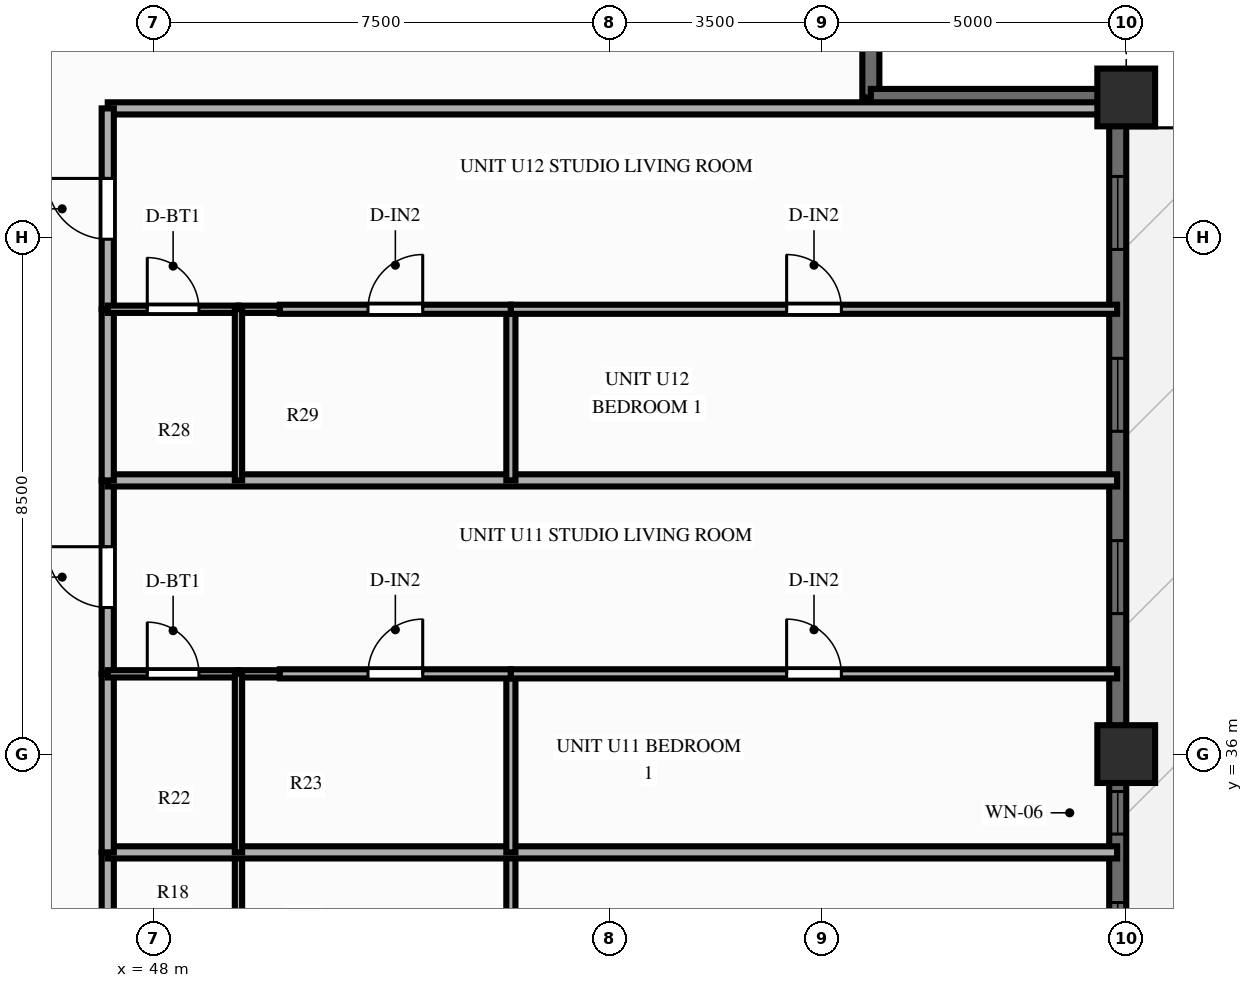
"""IFC4 building model, lengths in metres.
Left out: names, types, materials, properties, quantities, classifications, styles, units other than length and angle.
Written with IfcOpenShell. Run it as: python <this file> out.ifc"""

import sys

from ifc_helpers import new_model, si_unit, direction, frame, frame_2d, origin, origin_2d, place, context, subcontext, project, spatial, rectangle, extrude, source, transform, mapped, element, fill, save


model = new_model("IFC4")
c1 = context("Model", 3, precision=1e-05, world=origin(), true_north=direction((0.0, 1.0)))
c2 = subcontext(c1, "Body", "Model", "MODEL_VIEW")
j1 = project(units=[si_unit("LENGTHUNIT", "METRE"), si_unit("PLANEANGLEUNIT", "RADIAN")], contexts=[c1])
p1 = place(None, origin())
s1 = spatial("IfcSite", under=j1, at=p1, CompositionType="ELEMENT")
p2 = place(p1, origin())
s2 = spatial("IfcBuilding", under=s1, at=p2, CompositionType="ELEMENT")
p3 = place(p2, frame((0.0, 0.0, 92.85)))
s3 = spatial("IfcBuildingStorey", under=s2, at=p3, CompositionType="ELEMENT", Elevation=92.85)
m1 = source(origin(), c2, "Body", "SweptSolid", [
    extrude(rectangle(XDim=0.95, YDim=0.95, at=origin_2d()), origin(), (0.0, 0.0, 1.0), 3.0),
])
for number, where, z_axis, x_axis in (
    (1, (64.0, 36.0, 0.0), (0.0, 0.0, 1.0), (1.0, 0.0, 0.0)),
    (2, (64.0, 46.8, 0.0), (0.0, 0.0, 1.0), (1.0, 0.0, 0.0)),
):
    element("IfcColumn", number, at=place(p3, frame(where, z_axis=z_axis, x_axis=x_axis)), inside=s3, PredefinedType="COLUMN", context=c2, shape_type="MappedRepresentation", body=[
        mapped(m1, transform((0.0, 0.0, 0.0), scale=1.0)),
    ])
p4 = place(p3, frame((63.86, 7.2, 0.0), z_axis=(0.0, 0.0, 1.0), x_axis=(0.0, 1.0, 0.0)))
e3 = element("IfcWall", 3, at=p4, inside=s3, PredefinedType="SOLIDWALL", context=c2, shape_type="SweptSolid", body=[
    extrude(rectangle(XDim=39.6, YDim=0.28, at=frame_2d((19.8, 0.0))), origin(), (0.0, 0.0, 1.0), 2.28),
])
p5 = place(p4, frame((1.374, 0.0, 0.25)))
e4 = element("IfcOpeningElement", 4, at=p5, cuts=e3, PredefinedType="OPENING", context=c2, shape_type="SweptSolid", body=[
    extrude(rectangle(XDim=1.2, YDim=1.5, at=frame_2d((0.6, 0.75))), frame((0.0, 0.152, 0.0), z_axis=(0.0, -1.0, 0.0), x_axis=(1.0, 0.0, 0.0)), (0.0, 0.0, 1.0), 0.304),
])
p6 = place(p4, frame((4.458, 0.0, 0.25)))
e5 = element("IfcOpeningElement", 5, at=p6, cuts=e3, PredefinedType="OPENING", context=c2, shape_type="SweptSolid", body=[
    extrude(rectangle(XDim=1.2, YDim=1.5, at=frame_2d((0.6, 0.75))), frame((0.0, 0.152, 0.0), z_axis=(0.0, -1.0, 0.0), x_axis=(1.0, 0.0, 0.0)), (0.0, 0.0, 1.0), 0.304),
])
p7 = place(p4, frame((7.382, 0.0, 0.25)))
e6 = element("IfcOpeningElement", 6, at=p7, cuts=e3, PredefinedType="OPENING", context=c2, shape_type="SweptSolid", body=[
    extrude(rectangle(XDim=1.2, YDim=1.5, at=frame_2d((0.6, 0.75))), frame((0.0, 0.152, 0.0), z_axis=(0.0, -1.0, 0.0), x_axis=(1.0, 0.0, 0.0)), (0.0, 0.0, 1.0), 0.304),
])
p8 = place(p4, frame((11.508, 0.0, 0.25)))
e7 = element("IfcOpeningElement", 7, at=p8, cuts=e3, PredefinedType="OPENING", context=c2, shape_type="SweptSolid", body=[
    extrude(rectangle(XDim=0.7, YDim=1.5, at=frame_2d((0.35, 0.75))), frame((0.0, 0.152, 0.0), z_axis=(0.0, -1.0, 0.0), x_axis=(1.0, 0.0, 0.0)), (0.0, 0.0, 1.0), 0.304),
])
p9 = place(p4, frame((13.409, 0.0, 0.25)))
e8 = element("IfcOpeningElement", 8, at=p9, cuts=e3, PredefinedType="OPENING", context=c2, shape_type="SweptSolid", body=[
    extrude(rectangle(XDim=1.2, YDim=1.5, at=frame_2d((0.6, 0.75))), frame((0.0, 0.152, 0.0), z_axis=(0.0, -1.0, 0.0), x_axis=(1.0, 0.0, 0.0)), (0.0, 0.0, 1.0), 0.304),
])
p10 = place(p4, frame((16.468, 0.0, 0.25)))
e9 = element("IfcOpeningElement", 9, at=p10, cuts=e3, PredefinedType="OPENING", context=c2, shape_type="SweptSolid", body=[
    extrude(rectangle(XDim=1.2, YDim=1.5, at=frame_2d((0.6, 0.75))), frame((0.0, 0.152, 0.0), z_axis=(0.0, -1.0, 0.0), x_axis=(1.0, 0.0, 0.0)), (0.0, 0.0, 1.0), 0.304),
])
p11 = place(p4, frame((19.2, 0.0, 0.25)))
e10 = element("IfcOpeningElement", 10, at=p11, cuts=e3, PredefinedType="OPENING", context=c2, shape_type="SweptSolid", body=[
    extrude(rectangle(XDim=1.2, YDim=1.5, at=frame_2d((0.6, 0.75))), frame((0.0, 0.152, 0.0), z_axis=(0.0, -1.0, 0.0), x_axis=(1.0, 0.0, 0.0)), (0.0, 0.0, 1.0), 0.304),
])
p12 = place(p4, frame((23.407, 0.0, 0.0), z_axis=(0.0, 0.0, 1.0), x_axis=(-1.0, 0.0, 0.0)))
e11 = element("IfcOpeningElement", 11, at=p12, cuts=e3, PredefinedType="OPENING", context=c2, shape_type="SweptSolid", body=[
    extrude(rectangle(XDim=1.6, YDim=2.15, at=frame_2d((0.8, 1.075))), frame((0.0, 0.152, 0.0), z_axis=(0.0, -1.0, 0.0), x_axis=(1.0, 0.0, 0.0)), (0.0, 0.0, 1.0), 0.304),
])
p13 = place(p4, frame((25.159, 0.0, 0.25)))
e12 = element("IfcOpeningElement", 12, at=p13, cuts=e3, PredefinedType="OPENING", context=c2, shape_type="SweptSolid", body=[
    extrude(rectangle(XDim=1.2, YDim=1.5, at=frame_2d((0.6, 0.75))), frame((0.0, 0.152, 0.0), z_axis=(0.0, -1.0, 0.0), x_axis=(1.0, 0.0, 0.0)), (0.0, 0.0, 1.0), 0.304),
])
p14 = place(p4, frame((27.484, 0.0, 0.25)))
e13 = element("IfcOpeningElement", 13, at=p14, cuts=e3, PredefinedType="OPENING", context=c2, shape_type="SweptSolid", body=[
    extrude(rectangle(XDim=0.7, YDim=1.5, at=frame_2d((0.35, 0.75))), frame((0.0, 0.152, 0.0), z_axis=(0.0, -1.0, 0.0), x_axis=(1.0, 0.0, 0.0)), (0.0, 0.0, 1.0), 0.304),
])
p15 = place(p4, frame((31.111, 0.0, 0.25)))
e14 = element("IfcOpeningElement", 14, at=p15, cuts=e3, PredefinedType="OPENING", context=c2, shape_type="SweptSolid", body=[
    extrude(rectangle(XDim=1.2, YDim=1.5, at=frame_2d((0.6, 0.75))), frame((0.0, 0.152, 0.0), z_axis=(0.0, -1.0, 0.0), x_axis=(1.0, 0.0, 0.0)), (0.0, 0.0, 1.0), 0.304),
])
p16 = place(p4, frame((34.109, 0.0, 0.25)))
e15 = element("IfcOpeningElement", 15, at=p16, cuts=e3, PredefinedType="OPENING", context=c2, shape_type="SweptSolid", body=[
    extrude(rectangle(XDim=1.2, YDim=1.5, at=frame_2d((0.6, 0.75))), frame((0.0, 0.152, 0.0), z_axis=(0.0, -1.0, 0.0), x_axis=(1.0, 0.0, 0.0)), (0.0, 0.0, 1.0), 0.304),
])
p17 = place(p4, frame((37.101, 0.0, 0.25)))
e16 = element("IfcOpeningElement", 16, at=p17, cuts=e3, PredefinedType="OPENING", context=c2, shape_type="SweptSolid", body=[
    extrude(rectangle(XDim=1.2, YDim=1.5, at=frame_2d((0.6, 0.75))), frame((0.0, 0.152, 0.0), z_axis=(0.0, -1.0, 0.0), x_axis=(1.0, 0.0, 0.0)), (0.0, 0.0, 1.0), 0.304),
])
for number, where, z_axis, x_axis in (
    (17, (59.8, 46.8, 0.0), (0.0, 0.0, 1.0), (0.0, 1.0, 0.0)),
    (18, (59.8, 46.8, 0.0), (0.0, 0.0, 1.0), (1.0, 0.0, 0.0)),
):
    element("IfcWall", number, at=place(p3, frame(where, z_axis=z_axis, x_axis=x_axis)), inside=s3, PredefinedType="SOLIDWALL", context=c2, shape_type="SweptSolid", body=[
        extrude(rectangle(XDim=4.12, YDim=0.28, at=frame_2d((2.06, 0.0))), origin(), (0.0, 0.0, 1.0), 2.28),
    ])
p18 = place(p3, frame((47.25, 46.62, 0.0), z_axis=(0.0, 0.0, 1.0), x_axis=(1.0, 0.0, 0.0)))
e19 = element("IfcWall", 19, at=p18, inside=s3, PredefinedType="PARTITIONING", context=c2, shape_type="SweptSolid", body=[
    extrude(rectangle(XDim=16.6, YDim=0.2, at=frame_2d((8.3, 0.0))), origin(), (0.0, 0.0, 1.0), 2.79),
])
p19 = place(p3, frame((47.25, 31.534, 0.0), z_axis=(0.0, 0.0, 1.0), x_axis=(0.0, 1.0, 0.0)))
e20 = element("IfcWall", 20, at=p19, inside=s3, PredefinedType="PARTITIONING", context=c2, shape_type="SweptSolid", body=[
    extrude(rectangle(XDim=2.85, YDim=0.2, at=frame_2d((1.425, 0.0))), origin(), (0.0, 0.0, 1.0), 2.79),
])
p20 = place(p3, frame((49.4, 31.534, 0.0), z_axis=(0.0, 0.0, 1.0), x_axis=(0.0, 1.0, 0.0)))
e21 = element("IfcWall", 21, at=p20, inside=s3, PredefinedType="PARTITIONING", context=c2, shape_type="SweptSolid", body=[
    extrude(rectangle(XDim=2.85, YDim=0.12, at=frame_2d((1.425, 0.0))), origin(), (0.0, 0.0, 1.0), 2.79),
])
p21 = place(p3, frame((53.88, 31.534, 0.0), z_axis=(0.0, 0.0, 1.0), x_axis=(0.0, 1.0, 0.0)))
e22 = element("IfcWall", 22, at=p21, inside=s3, PredefinedType="PARTITIONING", context=c2, shape_type="SweptSolid", body=[
    extrude(rectangle(XDim=2.85, YDim=0.15, at=frame_2d((1.425, 0.0))), origin(), (0.0, 0.0, 1.0), 2.79),
])
p22 = place(p3, frame((47.25, 34.384, 0.0), z_axis=(0.0, 0.0, 1.0), x_axis=(1.0, 0.0, 0.0)))
e23 = element("IfcWall", 23, at=p22, inside=s3, PredefinedType="PARTITIONING", context=c2, shape_type="SweptSolid", body=[
    extrude(rectangle(XDim=16.6, YDim=0.2, at=frame_2d((8.3, 0.0))), origin(), (0.0, 0.0, 1.0), 2.79),
])
p23 = place(p3, frame((47.25, 34.384, 0.0), z_axis=(0.0, 0.0, 1.0), x_axis=(0.0, 1.0, 0.0)))
e24 = element("IfcWall", 24, at=p23, inside=s3, PredefinedType="PARTITIONING", context=c2, shape_type="SweptSolid", body=[
    extrude(rectangle(XDim=2.937, YDim=0.2, at=frame_2d((1.468, 0.0))), origin(), (0.0, 0.0, 1.0), 2.79),
])
p24 = place(p3, frame((47.25, 37.32, 0.0), z_axis=(0.0, 0.0, 1.0), x_axis=(0.0, 1.0, 0.0)))
e25 = element("IfcWall", 25, at=p24, inside=s3, PredefinedType="PARTITIONING", context=c2, shape_type="SweptSolid", body=[
    extrude(rectangle(XDim=3.182, YDim=0.2, at=frame_2d((1.591, 0.0))), origin(), (0.0, 0.0, 1.0), 2.79),
])
p25 = place(p24, frame((1.091, 0.0, 0.0)))
e26 = element("IfcOpeningElement", 26, at=p25, cuts=e25, PredefinedType="OPENING", context=c2, shape_type="SweptSolid", body=[
    extrude(rectangle(XDim=1.0, YDim=2.15, at=frame_2d((0.5, 1.075))), frame((0.0, 0.112, 0.0), z_axis=(0.0, -1.0, 0.0), x_axis=(1.0, 0.0, 0.0)), (0.0, 0.0, 1.0), 0.224),
])
p26 = place(p3, frame((47.25, 37.32, 0.0), z_axis=(0.0, 0.0, 1.0), x_axis=(1.0, 0.0, 0.0)))
e27 = element("IfcWall", 27, at=p26, inside=s3, PredefinedType="PARTITIONING", context=c2, shape_type="SweptSolid", body=[
    extrude(rectangle(XDim=2.15, YDim=0.12, at=frame_2d((1.075, 0.0))), origin(), (0.0, 0.0, 1.0), 2.79),
])
p27 = place(p26, frame((0.65, 0.0, 0.0)))
e28 = element("IfcOpeningElement", 28, at=p27, cuts=e27, PredefinedType="OPENING", context=c2, shape_type="SweptSolid", body=[
    extrude(rectangle(XDim=0.85, YDim=2.05, at=frame_2d((0.425, 1.025))), frame((0.0, 0.072, 0.0), z_axis=(0.0, -1.0, 0.0), x_axis=(1.0, 0.0, 0.0)), (0.0, 0.0, 1.0), 0.144),
])
p28 = place(p3, frame((49.4, 37.32, 0.0), z_axis=(0.0, 0.0, 1.0), x_axis=(1.0, 0.0, 0.0)))
e29 = element("IfcWall", 29, at=p28, inside=s3, PredefinedType="PARTITIONING", context=c2, shape_type="SweptSolid", body=[
    extrude(rectangle(XDim=0.68, YDim=0.12, at=frame_2d((0.34, 0.0))), origin(), (0.0, 0.0, 1.0), 2.79),
])
p29 = place(p3, frame((49.4, 34.384, 0.0), z_axis=(0.0, 0.0, 1.0), x_axis=(0.0, 1.0, 0.0)))
e30 = element("IfcWall", 30, at=p29, inside=s3, PredefinedType="PARTITIONING", context=c2, shape_type="SweptSolid", body=[
    extrude(rectangle(XDim=2.937, YDim=0.12, at=frame_2d((1.468, 0.0))), origin(), (0.0, 0.0, 1.0), 2.79),
])
p30 = place(p3, frame((53.88, 34.384, 0.0), z_axis=(0.0, 0.0, 1.0), x_axis=(0.0, 1.0, 0.0)))
e31 = element("IfcWall", 31, at=p30, inside=s3, PredefinedType="PARTITIONING", context=c2, shape_type="SweptSolid", body=[
    extrude(rectangle(XDim=2.937, YDim=0.15, at=frame_2d((1.468, 0.0))), origin(), (0.0, 0.0, 1.0), 2.79),
])
p31 = place(p3, frame((50.08, 37.32, 0.0), z_axis=(0.0, 0.0, 1.0), x_axis=(1.0, 0.0, 0.0)))
e32 = element("IfcWall", 32, at=p31, inside=s3, PredefinedType="PARTITIONING", context=c2, shape_type="SweptSolid", body=[
    extrude(rectangle(XDim=3.8, YDim=0.15, at=frame_2d((1.9, 0.0))), origin(), (0.0, 0.0, 1.0), 2.79),
])
p32 = place(p31, frame((1.45, 0.0, 0.0)))
e33 = element("IfcOpeningElement", 33, at=p32, cuts=e32, PredefinedType="OPENING", context=c2, shape_type="SweptSolid", body=[
    extrude(rectangle(XDim=0.9, YDim=2.1, at=frame_2d((0.45, 1.05))), frame((0.0, 0.087, 0.0), z_axis=(0.0, -1.0, 0.0), x_axis=(1.0, 0.0, 0.0)), (0.0, 0.0, 1.0), 0.174),
])
p33 = place(p3, frame((53.88, 37.32, 0.0), z_axis=(0.0, 0.0, 1.0), x_axis=(1.0, 0.0, 0.0)))
e34 = element("IfcWall", 34, at=p33, inside=s3, PredefinedType="PARTITIONING", context=c2, shape_type="SweptSolid", body=[
    extrude(rectangle(XDim=9.97, YDim=0.15, at=frame_2d((4.985, 0.0))), origin(), (0.0, 0.0, 1.0), 2.79),
])
p34 = place(p33, frame((4.535, 0.0, 0.0)))
e35 = element("IfcOpeningElement", 35, at=p34, cuts=e34, PredefinedType="OPENING", context=c2, shape_type="SweptSolid", body=[
    extrude(rectangle(XDim=0.9, YDim=2.1, at=frame_2d((0.45, 1.05))), frame((0.0, 0.087, 0.0), z_axis=(0.0, -1.0, 0.0), x_axis=(1.0, 0.0, 0.0)), (0.0, 0.0, 1.0), 0.174),
])
p35 = place(p3, frame((47.25, 40.502, 0.0), z_axis=(0.0, 0.0, 1.0), x_axis=(1.0, 0.0, 0.0)))
e36 = element("IfcWall", 36, at=p35, inside=s3, PredefinedType="PARTITIONING", context=c2, shape_type="SweptSolid", body=[
    extrude(rectangle(XDim=16.6, YDim=0.2, at=frame_2d((8.3, 0.0))), origin(), (0.0, 0.0, 1.0), 2.79),
])
p36 = place(p3, frame((47.25, 40.502, 0.0), z_axis=(0.0, 0.0, 1.0), x_axis=(0.0, 1.0, 0.0)))
e37 = element("IfcWall", 37, at=p36, inside=s3, PredefinedType="PARTITIONING", context=c2, shape_type="SweptSolid", body=[
    extrude(rectangle(XDim=2.814, YDim=0.2, at=frame_2d((1.407, 0.0))), origin(), (0.0, 0.0, 1.0), 2.79),
])
p37 = place(p3, frame((47.25, 43.316, 0.0), z_axis=(0.0, 0.0, 1.0), x_axis=(0.0, 1.0, 0.0)))
e38 = element("IfcWall", 38, at=p37, inside=s3, PredefinedType="PARTITIONING", context=c2, shape_type="SweptSolid", body=[
    extrude(rectangle(XDim=3.304, YDim=0.2, at=frame_2d((1.652, 0.0))), origin(), (0.0, 0.0, 1.0), 2.79),
])
p38 = place(p37, frame((1.152, 0.0, 0.0)))
e39 = element("IfcOpeningElement", 39, at=p38, cuts=e38, PredefinedType="OPENING", context=c2, shape_type="SweptSolid", body=[
    extrude(rectangle(XDim=1.0, YDim=2.15, at=frame_2d((0.5, 1.075))), frame((0.0, 0.112, 0.0), z_axis=(0.0, -1.0, 0.0), x_axis=(1.0, 0.0, 0.0)), (0.0, 0.0, 1.0), 0.224),
])
p39 = place(p3, frame((47.25, 43.316, 0.0), z_axis=(0.0, 0.0, 1.0), x_axis=(1.0, 0.0, 0.0)))
e40 = element("IfcWall", 40, at=p39, inside=s3, PredefinedType="PARTITIONING", context=c2, shape_type="SweptSolid", body=[
    extrude(rectangle(XDim=2.15, YDim=0.12, at=frame_2d((1.075, 0.0))), origin(), (0.0, 0.0, 1.0), 2.79),
])
p40 = place(p39, frame((0.65, 0.0, 0.0)))
e41 = element("IfcOpeningElement", 41, at=p40, cuts=e40, PredefinedType="OPENING", context=c2, shape_type="SweptSolid", body=[
    extrude(rectangle(XDim=0.85, YDim=2.05, at=frame_2d((0.425, 1.025))), frame((0.0, 0.072, 0.0), z_axis=(0.0, -1.0, 0.0), x_axis=(1.0, 0.0, 0.0)), (0.0, 0.0, 1.0), 0.144),
])
p41 = place(p3, frame((49.4, 43.316, 0.0), z_axis=(0.0, 0.0, 1.0), x_axis=(1.0, 0.0, 0.0)))
e42 = element("IfcWall", 42, at=p41, inside=s3, PredefinedType="PARTITIONING", context=c2, shape_type="SweptSolid", body=[
    extrude(rectangle(XDim=0.68, YDim=0.12, at=frame_2d((0.34, 0.0))), origin(), (0.0, 0.0, 1.0), 2.79),
])
p42 = place(p3, frame((49.4, 40.502, 0.0), z_axis=(0.0, 0.0, 1.0), x_axis=(0.0, 1.0, 0.0)))
e43 = element("IfcWall", 43, at=p42, inside=s3, PredefinedType="PARTITIONING", context=c2, shape_type="SweptSolid", body=[
    extrude(rectangle(XDim=2.814, YDim=0.12, at=frame_2d((1.407, 0.0))), origin(), (0.0, 0.0, 1.0), 2.79),
])
p43 = place(p3, frame((53.88, 40.502, 0.0), z_axis=(0.0, 0.0, 1.0), x_axis=(0.0, 1.0, 0.0)))
e44 = element("IfcWall", 44, at=p43, inside=s3, PredefinedType="PARTITIONING", context=c2, shape_type="SweptSolid", body=[
    extrude(rectangle(XDim=2.814, YDim=0.15, at=frame_2d((1.407, 0.0))), origin(), (0.0, 0.0, 1.0), 2.79),
])
p44 = place(p3, frame((50.08, 43.316, 0.0), z_axis=(0.0, 0.0, 1.0), x_axis=(1.0, 0.0, 0.0)))
e45 = element("IfcWall", 45, at=p44, inside=s3, PredefinedType="PARTITIONING", context=c2, shape_type="SweptSolid", body=[
    extrude(rectangle(XDim=3.8, YDim=0.15, at=frame_2d((1.9, 0.0))), origin(), (0.0, 0.0, 1.0), 2.79),
])
p45 = place(p44, frame((1.45, 0.0, 0.0)))
e46 = element("IfcOpeningElement", 46, at=p45, cuts=e45, PredefinedType="OPENING", context=c2, shape_type="SweptSolid", body=[
    extrude(rectangle(XDim=0.9, YDim=2.1, at=frame_2d((0.45, 1.05))), frame((0.0, 0.087, 0.0), z_axis=(0.0, -1.0, 0.0), x_axis=(1.0, 0.0, 0.0)), (0.0, 0.0, 1.0), 0.174),
])
p46 = place(p3, frame((53.88, 43.316, 0.0), z_axis=(0.0, 0.0, 1.0), x_axis=(1.0, 0.0, 0.0)))
e47 = element("IfcWall", 47, at=p46, inside=s3, PredefinedType="PARTITIONING", context=c2, shape_type="SweptSolid", body=[
    extrude(rectangle(XDim=9.97, YDim=0.15, at=frame_2d((4.985, 0.0))), origin(), (0.0, 0.0, 1.0), 2.79),
])
p47 = place(p46, frame((4.535, 0.0, 0.0)))
e48 = element("IfcOpeningElement", 48, at=p47, cuts=e47, PredefinedType="OPENING", context=c2, shape_type="SweptSolid", body=[
    extrude(rectangle(XDim=0.9, YDim=2.1, at=frame_2d((0.45, 1.05))), frame((0.0, 0.087, 0.0), z_axis=(0.0, -1.0, 0.0), x_axis=(1.0, 0.0, 0.0)), (0.0, 0.0, 1.0), 0.174),
])
m2 = source(origin(), c2, "Body", "SweptSolid", [
    extrude(rectangle(XDim=1.2, YDim=1.5, at=frame_2d((0.6, 0.75))), frame((0.0, 0.03, 0.0), z_axis=(0.0, -1.0, 0.0), x_axis=(1.0, 0.0, 0.0)), (0.0, 0.0, 1.0), 0.06),
])
p48 = place(p13, origin())
e49 = element("IfcWindow", 49, at=p48, inside=s3, PartitioningType="SINGLE_PANEL", PredefinedType="WINDOW", context=c2, shape_type="MappedRepresentation", body=[
    mapped(m2, transform((0.0, 0.0, 0.0), scale=1.0)),
])
fill(e12, e49)
m3 = source(origin(), c2, "Body", "SweptSolid", [
    extrude(rectangle(XDim=0.7, YDim=1.5, at=frame_2d((0.35, 0.75))), frame((0.0, 0.03, 0.0), z_axis=(0.0, -1.0, 0.0), x_axis=(1.0, 0.0, 0.0)), (0.0, 0.0, 1.0), 0.06),
])
p49 = place(p14, origin())
e50 = element("IfcWindow", 50, at=p49, inside=s3, PartitioningType="SINGLE_PANEL", PredefinedType="WINDOW", context=c2, shape_type="MappedRepresentation", body=[
    mapped(m3, transform((0.0, 0.0, 0.0), scale=1.0)),
])
fill(e13, e50)
p50 = place(p15, origin())
e51 = element("IfcWindow", 51, at=p50, inside=s3, PartitioningType="SINGLE_PANEL", PredefinedType="WINDOW", context=c2, shape_type="MappedRepresentation", body=[
    mapped(m2, transform((0.0, 0.0, 0.0), scale=1.0)),
])
fill(e14, e51)
p51 = place(p16, origin())
e52 = element("IfcWindow", 52, at=p51, inside=s3, PartitioningType="SINGLE_PANEL", PredefinedType="WINDOW", context=c2, shape_type="MappedRepresentation", body=[
    mapped(m2, transform((0.0, 0.0, 0.0), scale=1.0)),
])
fill(e15, e52)
p52 = place(p17, origin())
e53 = element("IfcWindow", 53, at=p52, inside=s3, PartitioningType="SINGLE_PANEL", PredefinedType="WINDOW", context=c2, shape_type="MappedRepresentation", body=[
    mapped(m2, transform((0.0, 0.0, 0.0), scale=1.0)),
])
fill(e16, e53)
m4 = source(origin(), c2, "Body", "SweptSolid", [
    extrude(rectangle(XDim=1.0, YDim=2.15, at=frame_2d((0.5, 1.075))), frame((0.0, 0.025, 0.0), z_axis=(0.0, -1.0, 0.0), x_axis=(1.0, 0.0, 0.0)), (0.0, 0.0, 1.0), 0.05),
])
p53 = place(p25, origin())
e54 = element("IfcDoor", 54, at=p53, inside=s3, OperationType="SINGLE_SWING_RIGHT", PredefinedType="DOOR", context=c2, shape_type="MappedRepresentation", body=[
    mapped(m4, transform((0.0, 0.0, 0.0), scale=1.0)),
])
fill(e26, e54)
m5 = source(origin(), c2, "Body", "SweptSolid", [
    extrude(rectangle(XDim=0.85, YDim=2.05, at=frame_2d((0.425, 1.025))), frame((0.0, 0.025, 0.0), z_axis=(0.0, -1.0, 0.0), x_axis=(1.0, 0.0, 0.0)), (0.0, 0.0, 1.0), 0.05),
])
p54 = place(p27, origin())
e55 = element("IfcDoor", 55, at=p54, inside=s3, OperationType="SINGLE_SWING_LEFT", PredefinedType="DOOR", context=c2, shape_type="MappedRepresentation", body=[
    mapped(m5, transform((0.0, 0.0, 0.0), scale=1.0)),
])
fill(e28, e55)
m6 = source(origin(), c2, "Body", "SweptSolid", [
    extrude(rectangle(XDim=0.9, YDim=2.1, at=frame_2d((0.45, 1.05))), frame((0.0, 0.025, 0.0), z_axis=(0.0, -1.0, 0.0), x_axis=(1.0, 0.0, 0.0)), (0.0, 0.0, 1.0), 0.05),
])
p55 = place(p32, origin())
e56 = element("IfcDoor", 56, at=p55, inside=s3, OperationType="SINGLE_SWING_RIGHT", PredefinedType="DOOR", context=c2, shape_type="MappedRepresentation", body=[
    mapped(m6, transform((0.0, 0.0, 0.0), scale=1.0)),
])
fill(e33, e56)
p56 = place(p34, origin())
e57 = element("IfcDoor", 57, at=p56, inside=s3, OperationType="SINGLE_SWING_LEFT", PredefinedType="DOOR", context=c2, shape_type="MappedRepresentation", body=[
    mapped(m6, transform((0.0, 0.0, 0.0), scale=1.0)),
])
fill(e35, e57)
p57 = place(p38, origin())
e58 = element("IfcDoor", 58, at=p57, inside=s3, OperationType="SINGLE_SWING_RIGHT", PredefinedType="DOOR", context=c2, shape_type="MappedRepresentation", body=[
    mapped(m4, transform((0.0, 0.0, 0.0), scale=1.0)),
])
fill(e39, e58)
p58 = place(p40, origin())
e59 = element("IfcDoor", 59, at=p58, inside=s3, OperationType="SINGLE_SWING_LEFT", PredefinedType="DOOR", context=c2, shape_type="MappedRepresentation", body=[
    mapped(m5, transform((0.0, 0.0, 0.0), scale=1.0)),
])
fill(e41, e59)
p59 = place(p45, origin())
e60 = element("IfcDoor", 60, at=p59, inside=s3, OperationType="SINGLE_SWING_RIGHT", PredefinedType="DOOR", context=c2, shape_type="MappedRepresentation", body=[
    mapped(m6, transform((0.0, 0.0, 0.0), scale=1.0)),
])
fill(e46, e60)
p60 = place(p47, origin())
e61 = element("IfcDoor", 61, at=p60, inside=s3, OperationType="SINGLE_SWING_LEFT", PredefinedType="DOOR", context=c2, shape_type="MappedRepresentation", body=[
    mapped(m6, transform((0.0, 0.0, 0.0), scale=1.0)),
])
fill(e48, e61)
save(model, sys.argv[1])
